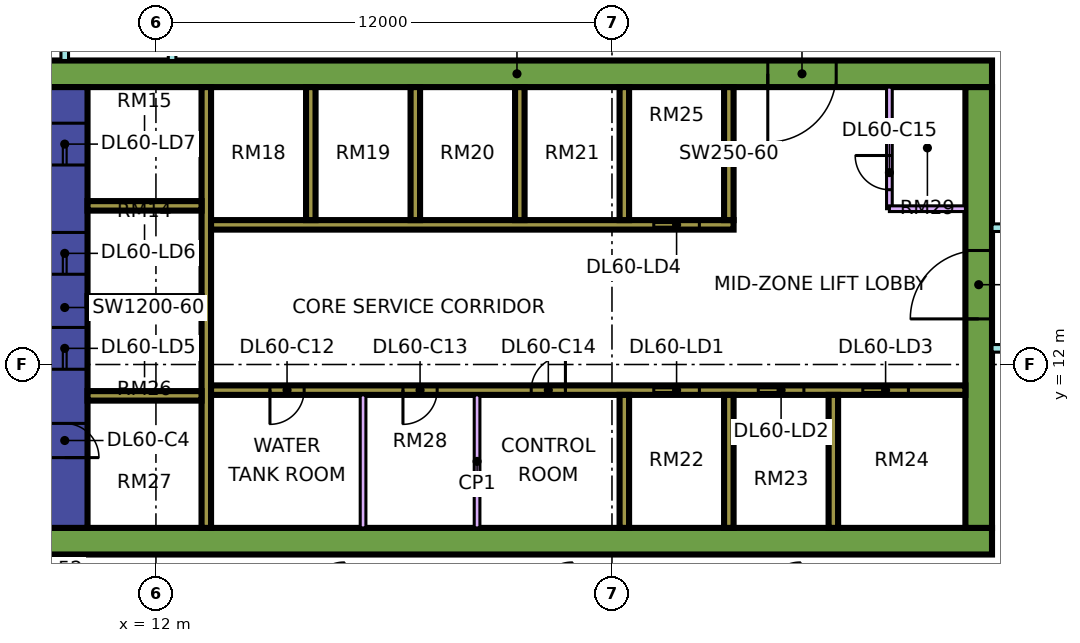
"""IFC4 building model, lengths in metres.
Left out: names, types, materials, properties, quantities, classifications, styles, units other than length and angle.
Written with IfcOpenShell. Run it as: python <this file> out.ifc"""

import sys

from ifc_helpers import new_model, si_unit, direction, frame, frame_2d, origin, place, context, subcontext, project, spatial, rectangle, extrude, element, fill, save


model = new_model("IFC4")
c1 = context("Model", 3, precision=1e-05, world=origin(), true_north=direction((0.0, 1.0)))
c2 = subcontext(c1, "Body", "Model", "MODEL_VIEW")
j1 = project(units=[si_unit("LENGTHUNIT", "METRE"), si_unit("PLANEANGLEUNIT", "RADIAN")], contexts=[c1])
p1 = place(None, origin())
s1 = spatial("IfcSite", under=j1, at=p1, CompositionType="ELEMENT")
p2 = place(p1, origin())
s2 = spatial("IfcBuilding", under=s1, at=p2, CompositionType="ELEMENT")
p3 = place(p2, frame((0.0, 0.0, 252.9)))
s3 = spatial("IfcBuildingStorey", under=s2, at=p3, CompositionType="ELEMENT", Elevation=252.9)
p4 = place(p3, frame((9.0, 7.35, 0.0), z_axis=(0.0, 0.0, 1.0), x_axis=(1.0, 0.0, 0.0)))
e1 = element("IfcWall", 1, at=p4, inside=s3, PredefinedType="SHEAR", context=c2, shape_type="SweptSolid", body=[
    extrude(rectangle(XDim=25.0, YDim=0.7, at=frame_2d((12.5, 0.0))), origin(), (0.0, 0.0, 1.0), 3.75),
])
p5 = place(p3, frame((9.0, 19.65, 0.0), z_axis=(0.0, 0.0, 1.0), x_axis=(1.0, 0.0, 0.0)))
e2 = element("IfcWall", 2, at=p5, inside=s3, PredefinedType="SHEAR", context=c2, shape_type="SweptSolid", body=[
    extrude(rectangle(XDim=25.0, YDim=0.7, at=frame_2d((12.5, 0.0))), origin(), (0.0, 0.0, 1.0), 3.75),
])
p6 = place(p5, frame((19.1, 0.0, 0.0)))
e3 = element("IfcOpeningElement", 3, at=p6, cuts=e2, PredefinedType="OPENING", context=c2, shape_type="SweptSolid", body=[
    extrude(rectangle(XDim=1.8, YDim=2.4, at=frame_2d((0.9, 1.2))), frame((0.0, 0.36, 0.0), z_axis=(0.0, -1.0, 0.0), x_axis=(1.0, 0.0, 0.0)), (0.0, 0.0, 1.0), 0.72),
])
p7 = place(p3, frame((9.6, 7.7, 0.0), z_axis=(0.0, 0.0, 1.0), x_axis=(0.0, 1.0, 0.0)))
e4 = element("IfcWall", 4, at=p7, inside=s3, PredefinedType="SHEAR", context=c2, shape_type="SweptSolid", body=[
    extrude(rectangle(XDim=11.6, YDim=1.2, at=frame_2d((5.8, 0.0))), origin(), (0.0, 0.0, 1.0), 3.75),
])
p8 = place(p7, frame((4.175, 0.0, 0.0)))
e5 = element("IfcOpeningElement", 5, at=p8, cuts=e4, PredefinedType="OPENING", context=c2, shape_type="SweptSolid", body=[
    extrude(rectangle(XDim=1.1, YDim=2.2, at=frame_2d((0.55, 1.1))), frame((0.0, 0.61, 0.0), z_axis=(0.0, -1.0, 0.0), x_axis=(1.0, 0.0, 0.0)), (0.0, 0.0, 1.0), 1.22),
])
p9 = place(p7, frame((6.675, 0.0, 0.0)))
e6 = element("IfcOpeningElement", 6, at=p9, cuts=e4, PredefinedType="OPENING", context=c2, shape_type="SweptSolid", body=[
    extrude(rectangle(XDim=1.1, YDim=2.2, at=frame_2d((0.55, 1.1))), frame((0.0, 0.61, 0.0), z_axis=(0.0, -1.0, 0.0), x_axis=(1.0, 0.0, 0.0)), (0.0, 0.0, 1.0), 1.22),
])
p10 = place(p7, frame((9.55, 0.0, 0.0)))
e7 = element("IfcOpeningElement", 7, at=p10, cuts=e4, PredefinedType="OPENING", context=c2, shape_type="SweptSolid", body=[
    extrude(rectangle(XDim=1.1, YDim=2.2, at=frame_2d((0.55, 1.1))), frame((0.0, 0.61, 0.0), z_axis=(0.0, -1.0, 0.0), x_axis=(1.0, 0.0, 0.0)), (0.0, 0.0, 1.0), 1.22),
])
p11 = place(p7, frame((1.85, 0.0, 0.0)))
e8 = element("IfcOpeningElement", 8, at=p11, cuts=e4, PredefinedType="OPENING", context=c2, shape_type="SweptSolid", body=[
    extrude(rectangle(XDim=0.9, YDim=2.1, at=frame_2d((0.45, 1.05))), frame((0.0, 0.61, 0.0), z_axis=(0.0, -1.0, 0.0), x_axis=(1.0, 0.0, 0.0)), (0.0, 0.0, 1.0), 1.22),
])
p12 = place(p3, frame((33.65, 7.7, 0.0), z_axis=(0.0, 0.0, 1.0), x_axis=(0.0, 1.0, 0.0)))
e9 = element("IfcWall", 9, at=p12, inside=s3, PredefinedType="SHEAR", context=c2, shape_type="SweptSolid", body=[
    extrude(rectangle(XDim=11.6, YDim=0.7, at=frame_2d((5.8, 0.0))), origin(), (0.0, 0.0, 1.0), 3.75),
])
p13 = place(p12, frame((5.5, 0.0, 0.0)))
e10 = element("IfcOpeningElement", 10, at=p13, cuts=e9, PredefinedType="OPENING", context=c2, shape_type="SweptSolid", body=[
    extrude(rectangle(XDim=1.8, YDim=2.4, at=frame_2d((0.9, 1.2))), frame((0.0, 0.36, 0.0), z_axis=(0.0, -1.0, 0.0), x_axis=(1.0, 0.0, 0.0)), (0.0, 0.0, 1.0), 0.72),
])
p14 = place(p3, frame((13.325, 7.7, 0.0), z_axis=(0.0, 0.0, 1.0), x_axis=(0.0, 1.0, 0.0)))
e11 = element("IfcWall", 11, at=p14, inside=s3, PredefinedType="SHEAR", context=c2, shape_type="SweptSolid", body=[
    extrude(rectangle(XDim=11.6, YDim=0.25, at=frame_2d((5.8, 0.0))), origin(), (0.0, 0.0, 1.0), 3.75),
])
p15 = place(p3, frame((13.45, 11.325, 0.0), z_axis=(0.0, 0.0, 1.0), x_axis=(1.0, 0.0, 0.0)))
e12 = element("IfcWall", 12, at=p15, inside=s3, PredefinedType="SHEAR", context=c2, shape_type="SweptSolid", body=[
    extrude(rectangle(XDim=19.85, YDim=0.25, at=frame_2d((9.925, 0.0))), origin(), (0.0, 0.0, 1.0), 3.75),
])
p16 = place(p15, frame((11.65, 0.0, 0.0)))
e13 = element("IfcOpeningElement", 13, at=p16, cuts=e12, PredefinedType="OPENING", context=c2, shape_type="SweptSolid", body=[
    extrude(rectangle(XDim=1.2, YDim=2.2, at=frame_2d((0.6, 1.1))), frame((0.0, 0.135, 0.0), z_axis=(0.0, -1.0, 0.0), x_axis=(1.0, 0.0, 0.0)), (0.0, 0.0, 1.0), 0.27),
])
p17 = place(p15, frame((14.4, 0.0, 0.0)))
e14 = element("IfcOpeningElement", 14, at=p17, cuts=e12, PredefinedType="OPENING", context=c2, shape_type="SweptSolid", body=[
    extrude(rectangle(XDim=1.2, YDim=2.2, at=frame_2d((0.6, 1.1))), frame((0.0, 0.135, 0.0), z_axis=(0.0, -1.0, 0.0), x_axis=(1.0, 0.0, 0.0)), (0.0, 0.0, 1.0), 0.27),
])
p18 = place(p15, frame((17.15, 0.0, 0.0)))
e15 = element("IfcOpeningElement", 15, at=p18, cuts=e12, PredefinedType="OPENING", context=c2, shape_type="SweptSolid", body=[
    extrude(rectangle(XDim=1.2, YDim=2.2, at=frame_2d((0.6, 1.1))), frame((0.0, 0.135, 0.0), z_axis=(0.0, -1.0, 0.0), x_axis=(1.0, 0.0, 0.0)), (0.0, 0.0, 1.0), 0.27),
])
p19 = place(p15, frame((1.55, 0.0, 0.0)))
e16 = element("IfcOpeningElement", 16, at=p19, cuts=e12, PredefinedType="OPENING", context=c2, shape_type="SweptSolid", body=[
    extrude(rectangle(XDim=0.9, YDim=2.1, at=frame_2d((0.45, 1.05))), frame((0.0, 0.135, 0.0), z_axis=(0.0, -1.0, 0.0), x_axis=(1.0, 0.0, 0.0)), (0.0, 0.0, 1.0), 0.27),
])
p20 = place(p15, frame((5.05, 0.0, 0.0)))
e17 = element("IfcOpeningElement", 17, at=p20, cuts=e12, PredefinedType="OPENING", context=c2, shape_type="SweptSolid", body=[
    extrude(rectangle(XDim=0.9, YDim=2.1, at=frame_2d((0.45, 1.05))), frame((0.0, 0.135, 0.0), z_axis=(0.0, -1.0, 0.0), x_axis=(1.0, 0.0, 0.0)), (0.0, 0.0, 1.0), 0.27),
])
p21 = place(p15, frame((8.425, 0.0, 0.0)))
e18 = element("IfcOpeningElement", 18, at=p21, cuts=e12, PredefinedType="OPENING", context=c2, shape_type="SweptSolid", body=[
    extrude(rectangle(XDim=0.9, YDim=2.1, at=frame_2d((0.45, 1.05))), frame((0.0, 0.135, 0.0), z_axis=(0.0, -1.0, 0.0), x_axis=(1.0, 0.0, 0.0)), (0.0, 0.0, 1.0), 0.27),
])
p22 = place(p3, frame((13.45, 15.675, 0.0), z_axis=(0.0, 0.0, 1.0), x_axis=(1.0, 0.0, 0.0)))
e19 = element("IfcWall", 19, at=p22, inside=s3, PredefinedType="SHEAR", context=c2, shape_type="SweptSolid", body=[
    extrude(rectangle(XDim=13.75, YDim=0.25, at=frame_2d((6.875, 0.0))), origin(), (0.0, 0.0, 1.0), 3.75),
])
p23 = place(p22, frame((11.65, 0.0, 0.0)))
e20 = element("IfcOpeningElement", 20, at=p23, cuts=e19, PredefinedType="OPENING", context=c2, shape_type="SweptSolid", body=[
    extrude(rectangle(XDim=1.2, YDim=2.2, at=frame_2d((0.6, 1.1))), frame((0.0, 0.135, 0.0), z_axis=(0.0, -1.0, 0.0), x_axis=(1.0, 0.0, 0.0)), (0.0, 0.0, 1.0), 0.27),
])
for number, where, z_axis, x_axis in (
    (21, (10.2, 11.175, 0.0), (0.0, 0.0, 1.0), (1.0, 0.0, 0.0)),
    (22, (10.2, 13.675, 0.0), (0.0, 0.0, 1.0), (1.0, 0.0, 0.0)),
    (23, (10.2, 16.175, 0.0), (0.0, 0.0, 1.0), (1.0, 0.0, 0.0)),
):
    element("IfcWall", number, at=place(p3, frame(where, z_axis=z_axis, x_axis=x_axis)), inside=s3, PredefinedType="SHEAR", context=c2, shape_type="SweptSolid", body=[
        extrude(rectangle(XDim=3.0, YDim=0.25, at=frame_2d((1.5, 0.0))), origin(), (0.0, 0.0, 1.0), 3.75),
    ])
for number, where, z_axis, x_axis in (
    (24, (24.325, 7.7, 0.0), (0.0, 0.0, 1.0), (0.0, 1.0, 0.0)),
    (25, (27.075, 7.7, 0.0), (0.0, 0.0, 1.0), (0.0, 1.0, 0.0)),
    (26, (29.825, 7.7, 0.0), (0.0, 0.0, 1.0), (0.0, 1.0, 0.0)),
    (27, (16.075, 15.8, 0.0), (0.0, 0.0, 1.0), (0.0, 1.0, 0.0)),
    (28, (18.825, 15.8, 0.0), (0.0, 0.0, 1.0), (0.0, 1.0, 0.0)),
    (29, (21.575, 15.8, 0.0), (0.0, 0.0, 1.0), (0.0, 1.0, 0.0)),
    (30, (24.325, 15.8, 0.0), (0.0, 0.0, 1.0), (0.0, 1.0, 0.0)),
    (31, (27.075, 15.8, 0.0), (0.0, 0.0, 1.0), (0.0, 1.0, 0.0)),
):
    element("IfcWall", number, at=place(p3, frame(where, z_axis=z_axis, x_axis=x_axis)), inside=s3, PredefinedType="SHEAR", context=c2, shape_type="SweptSolid", body=[
        extrude(rectangle(XDim=3.5, YDim=0.25, at=frame_2d((1.75, 0.0))), origin(), (0.0, 0.0, 1.0), 3.75),
    ])
p24 = place(p3, frame((-1.447, 12.553, 0.0), z_axis=(0.0, 0.0, 1.0), x_axis=(0.707106781187, -0.707106781187, 0.0)))
e32 = element("IfcWall", 32, at=p24, inside=s3, PredefinedType="SOLIDWALL", context=c2, shape_type="SweptSolid", body=[
    extrude(rectangle(XDim=19.799, YDim=0.15, at=frame_2d((9.899, 0.0))), origin(), (0.0, 0.0, 1.0), 3.3),
])
p25 = place(p24, frame((2.212, 0.0, 0.45)))
e33 = element("IfcOpeningElement", 33, at=p25, cuts=e32, PredefinedType="OPENING", context=c2, shape_type="SweptSolid", body=[
    extrude(rectangle(XDim=3.0, YDim=2.4, at=frame_2d((1.5, 1.2))), frame((0.0, 0.085, 0.0), z_axis=(0.0, -1.0, 0.0), x_axis=(1.0, 0.0, 0.0)), (0.0, 0.0, 1.0), 0.17),
])
p26 = place(p24, frame((10.216, 0.0, 0.45)))
e34 = element("IfcOpeningElement", 34, at=p26, cuts=e32, PredefinedType="OPENING", context=c2, shape_type="SweptSolid", body=[
    extrude(rectangle(XDim=3.0, YDim=2.4, at=frame_2d((1.5, 1.2))), frame((0.0, 0.085, 0.0), z_axis=(0.0, -1.0, 0.0), x_axis=(1.0, 0.0, 0.0)), (0.0, 0.0, 1.0), 0.17),
])
for number, where, z_axis, x_axis in (
    (35, (17.45, 7.7, 0.0), (0.0, 0.0, 1.0), (0.0, 1.0, 0.0)),
    (36, (20.45, 7.7, 0.0), (0.0, 0.0, 1.0), (0.0, 1.0, 0.0)),
):
    element("IfcWall", number, at=place(p3, frame(where, z_axis=z_axis, x_axis=x_axis)), inside=s3, PredefinedType="PARTITIONING", context=c2, shape_type="SweptSolid", body=[
        extrude(rectangle(XDim=3.5, YDim=0.15, at=frame_2d((1.75, 0.0))), origin(), (0.0, 0.0, 1.0), 3.3),
    ])
p27 = place(p3, frame((31.3, 16.1, 0.0), z_axis=(0.0, 0.0, 1.0), x_axis=(0.0, 1.0, 0.0)))
e37 = element("IfcWall", 37, at=p27, inside=s3, PredefinedType="PARTITIONING", context=c2, shape_type="SweptSolid", body=[
    extrude(rectangle(XDim=3.2, YDim=0.15, at=frame_2d((1.6, 0.0))), origin(), (0.0, 0.0, 1.0), 3.3),
])
p28 = place(p27, frame((0.5, 0.0, 0.0)))
e38 = element("IfcOpeningElement", 38, at=p28, cuts=e37, PredefinedType="OPENING", context=c2, shape_type="SweptSolid", body=[
    extrude(rectangle(XDim=0.9, YDim=2.1, at=frame_2d((0.45, 1.05))), frame((0.0, 0.085, 0.0), z_axis=(0.0, -1.0, 0.0), x_axis=(1.0, 0.0, 0.0)), (0.0, 0.0, 1.0), 0.17),
])
p29 = place(p3, frame((31.3, 16.1, 0.0), z_axis=(0.0, 0.0, 1.0), x_axis=(1.0, 0.0, 0.0)))
e39 = element("IfcWall", 39, at=p29, inside=s3, PredefinedType="PARTITIONING", context=c2, shape_type="SweptSolid", body=[
    extrude(rectangle(XDim=2.0, YDim=0.15, at=frame_2d((1.0, 0.0))), origin(), (0.0, 0.0, 1.0), 3.3),
])
p30 = place(p3, frame((9.6, 20.0, 0.0), z_axis=(0.0, 0.0, 1.0), x_axis=(0.0, 1.0, 0.0)))
e40 = element("IfcWall", 40, at=p30, inside=s3, PredefinedType="PARTITIONING", context=c2, shape_type="SweptSolid", body=[
    extrude(rectangle(XDim=44.35, YDim=0.2, at=frame_2d((22.175, 0.0))), origin(), (0.0, 0.0, 1.0), 3.3),
])
p31 = place(p30, frame((28.8, 0.0, 0.0)))
e41 = element("IfcOpeningElement", 41, at=p31, cuts=e40, PredefinedType="OPENING", context=c2, shape_type="SweptSolid", body=[
    extrude(rectangle(XDim=1.0, YDim=2.1, at=frame_2d((0.5, 1.05))), frame((0.0, 0.11, 0.0), z_axis=(0.0, -1.0, 0.0), x_axis=(1.0, 0.0, 0.0)), (0.0, 0.0, 1.0), 0.22),
])
p32 = place(p30, frame((0.6, 0.0, 0.0)))
e42 = element("IfcOpeningElement", 42, at=p32, cuts=e40, PredefinedType="OPENING", context=c2, shape_type="SweptSolid", body=[
    extrude(rectangle(XDim=1.2, YDim=2.1, at=frame_2d((0.6, 1.05))), frame((0.0, 0.11, 0.0), z_axis=(0.0, -1.0, 0.0), x_axis=(1.0, 0.0, 0.0)), (0.0, 0.0, 1.0), 0.22),
])
p33 = place(p30, frame((3.9, 0.0, 0.0)))
e43 = element("IfcOpeningElement", 43, at=p33, cuts=e40, PredefinedType="OPENING", context=c2, shape_type="SweptSolid", body=[
    extrude(rectangle(XDim=1.0, YDim=2.1, at=frame_2d((0.5, 1.05))), frame((0.0, 0.11, 0.0), z_axis=(0.0, -1.0, 0.0), x_axis=(1.0, 0.0, 0.0)), (0.0, 0.0, 1.0), 0.22),
])
p34 = place(p3, frame((12.425, 20.0, 0.0), z_axis=(0.0, 0.0, 1.0), x_axis=(0.0, 1.0, 0.0)))
e44 = element("IfcWall", 44, at=p34, inside=s3, PredefinedType="PARTITIONING", context=c2, shape_type="SweptSolid", body=[
    extrude(rectangle(XDim=42.926, YDim=0.2, at=frame_2d((21.463, 0.0))), origin(), (0.0, 0.0, 1.0), 3.3),
])
p35 = place(p34, frame((7.0, 0.0, 0.0)))
e45 = element("IfcOpeningElement", 45, at=p35, cuts=e44, PredefinedType="OPENING", context=c2, shape_type="SweptSolid", body=[
    extrude(rectangle(XDim=1.0, YDim=2.1, at=frame_2d((0.5, 1.05))), frame((0.0, 0.11, 0.0), z_axis=(0.0, -1.0, 0.0), x_axis=(1.0, 0.0, 0.0)), (0.0, 0.0, 1.0), 0.22),
])
p36 = place(p34, frame((12.95, 0.0, 0.0)))
e46 = element("IfcOpeningElement", 46, at=p36, cuts=e44, PredefinedType="OPENING", context=c2, shape_type="SweptSolid", body=[
    extrude(rectangle(XDim=1.0, YDim=2.1, at=frame_2d((0.5, 1.05))), frame((0.0, 0.11, 0.0), z_axis=(0.0, -1.0, 0.0), x_axis=(1.0, 0.0, 0.0)), (0.0, 0.0, 1.0), 0.22),
])
p37 = place(p34, frame((16.75, 0.0, 0.0)))
e47 = element("IfcOpeningElement", 47, at=p37, cuts=e44, PredefinedType="OPENING", context=c2, shape_type="SweptSolid", body=[
    extrude(rectangle(XDim=1.0, YDim=2.1, at=frame_2d((0.5, 1.05))), frame((0.0, 0.11, 0.0), z_axis=(0.0, -1.0, 0.0), x_axis=(1.0, 0.0, 0.0)), (0.0, 0.0, 1.0), 0.22),
])
p38 = place(p34, frame((34.9, 0.0, 0.0)))
e48 = element("IfcOpeningElement", 48, at=p38, cuts=e44, PredefinedType="OPENING", context=c2, shape_type="SweptSolid", body=[
    extrude(rectangle(XDim=1.0, YDim=2.1, at=frame_2d((0.5, 1.05))), frame((0.0, 0.11, 0.0), z_axis=(0.0, -1.0, 0.0), x_axis=(1.0, 0.0, 0.0)), (0.0, 0.0, 1.0), 0.22),
])
p39 = place(p34, frame((1.15, 0.0, 0.0)))
e49 = element("IfcOpeningElement", 49, at=p39, cuts=e44, PredefinedType="OPENING", context=c2, shape_type="SweptSolid", body=[
    extrude(rectangle(XDim=1.8, YDim=2.1, at=frame_2d((0.9, 1.05))), frame((0.0, 0.11, 0.0), z_axis=(0.0, -1.0, 0.0), x_axis=(1.0, 0.0, 0.0)), (0.0, 0.0, 1.0), 0.22),
])
p40 = place(p34, frame((28.6, 0.0, 0.0)))
e50 = element("IfcOpeningElement", 50, at=p40, cuts=e44, PredefinedType="OPENING", context=c2, shape_type="SweptSolid", body=[
    extrude(rectangle(XDim=1.8, YDim=2.1, at=frame_2d((0.9, 1.05))), frame((0.0, 0.11, 0.0), z_axis=(0.0, -1.0, 0.0), x_axis=(1.0, 0.0, 0.0)), (0.0, 0.0, 1.0), 0.22),
])
p41 = place(p3, frame((34.0, 12.425, 0.0), z_axis=(0.0, 0.0, 1.0), x_axis=(1.0, 0.0, 0.0)))
e51 = element("IfcWall", 51, at=p41, inside=s3, PredefinedType="PARTITIONING", context=c2, shape_type="SweptSolid", body=[
    extrude(rectangle(XDim=2.426, YDim=0.2, at=frame_2d((1.213, 0.0))), origin(), (0.0, 0.0, 1.0), 3.3),
])
p42 = place(p3, frame((34.0, 15.6, 0.0), z_axis=(0.0, 0.0, 1.0), x_axis=(1.0, 0.0, 0.0)))
e52 = element("IfcWall", 52, at=p42, inside=s3, PredefinedType="PARTITIONING", context=c2, shape_type="SweptSolid", body=[
    extrude(rectangle(XDim=10.35, YDim=0.2, at=frame_2d((5.175, 0.0))), origin(), (0.0, 0.0, 1.0), 3.3),
])
p43 = place(p42, frame((5.6, 0.0, 0.0)))
e53 = element("IfcOpeningElement", 53, at=p43, cuts=e52, PredefinedType="OPENING", context=c2, shape_type="SweptSolid", body=[
    extrude(rectangle(XDim=1.0, YDim=2.1, at=frame_2d((0.5, 1.05))), frame((0.0, 0.11, 0.0), z_axis=(0.0, -1.0, 0.0), x_axis=(1.0, 0.0, 0.0)), (0.0, 0.0, 1.0), 0.22),
])
p44 = place(p42, frame((0.45, 0.0, 0.0)))
e54 = element("IfcOpeningElement", 54, at=p44, cuts=e52, PredefinedType="OPENING", context=c2, shape_type="SweptSolid", body=[
    extrude(rectangle(XDim=1.2, YDim=2.1, at=frame_2d((0.6, 1.05))), frame((0.0, 0.11, 0.0), z_axis=(0.0, -1.0, 0.0), x_axis=(1.0, 0.0, 0.0)), (0.0, 0.0, 1.0), 0.22),
])
p45 = place(p16, origin())
e55 = element("IfcDoor", 55, at=p45, inside=s3, OperationType="DOUBLE_DOOR_SLIDING", PredefinedType="DOOR", context=c2, shape_type="SweptSolid", body=[
    extrude(rectangle(XDim=1.2, YDim=2.2, at=frame_2d((0.6, 1.1))), frame((0.0, 0.025, 0.0), z_axis=(0.0, -1.0, 0.0), x_axis=(1.0, 0.0, 0.0)), (0.0, 0.0, 1.0), 0.05),
])
fill(e13, e55)
p46 = place(p17, origin())
e56 = element("IfcDoor", 56, at=p46, inside=s3, OperationType="DOUBLE_DOOR_SLIDING", PredefinedType="DOOR", context=c2, shape_type="SweptSolid", body=[
    extrude(rectangle(XDim=1.2, YDim=2.2, at=frame_2d((0.6, 1.1))), frame((0.0, 0.025, 0.0), z_axis=(0.0, -1.0, 0.0), x_axis=(1.0, 0.0, 0.0)), (0.0, 0.0, 1.0), 0.05),
])
fill(e14, e56)
p47 = place(p18, origin())
e57 = element("IfcDoor", 57, at=p47, inside=s3, OperationType="DOUBLE_DOOR_SLIDING", PredefinedType="DOOR", context=c2, shape_type="SweptSolid", body=[
    extrude(rectangle(XDim=1.2, YDim=2.2, at=frame_2d((0.6, 1.1))), frame((0.0, 0.025, 0.0), z_axis=(0.0, -1.0, 0.0), x_axis=(1.0, 0.0, 0.0)), (0.0, 0.0, 1.0), 0.05),
])
fill(e15, e57)
p48 = place(p23, origin())
e58 = element("IfcDoor", 58, at=p48, inside=s3, OperationType="DOUBLE_DOOR_SLIDING", PredefinedType="DOOR", context=c2, shape_type="SweptSolid", body=[
    extrude(rectangle(XDim=1.2, YDim=2.2, at=frame_2d((0.6, 1.1))), frame((0.0, 0.025, 0.0), z_axis=(0.0, -1.0, 0.0), x_axis=(1.0, 0.0, 0.0)), (0.0, 0.0, 1.0), 0.05),
])
fill(e20, e58)
p49 = place(p8, origin())
e59 = element("IfcDoor", 59, at=p49, inside=s3, OperationType="DOUBLE_DOOR_SLIDING", PredefinedType="DOOR", context=c2, shape_type="SweptSolid", body=[
    extrude(rectangle(XDim=1.1, YDim=2.2, at=frame_2d((0.55, 1.1))), frame((0.0, 0.025, 0.0), z_axis=(0.0, -1.0, 0.0), x_axis=(1.0, 0.0, 0.0)), (0.0, 0.0, 1.0), 0.05),
])
fill(e5, e59)
p50 = place(p9, origin())
e60 = element("IfcDoor", 60, at=p50, inside=s3, OperationType="DOUBLE_DOOR_SLIDING", PredefinedType="DOOR", context=c2, shape_type="SweptSolid", body=[
    extrude(rectangle(XDim=1.1, YDim=2.2, at=frame_2d((0.55, 1.1))), frame((0.0, 0.025, 0.0), z_axis=(0.0, -1.0, 0.0), x_axis=(1.0, 0.0, 0.0)), (0.0, 0.0, 1.0), 0.05),
])
fill(e6, e60)
p51 = place(p10, origin())
e61 = element("IfcDoor", 61, at=p51, inside=s3, OperationType="DOUBLE_DOOR_SLIDING", PredefinedType="DOOR", context=c2, shape_type="SweptSolid", body=[
    extrude(rectangle(XDim=1.1, YDim=2.2, at=frame_2d((0.55, 1.1))), frame((0.0, 0.025, 0.0), z_axis=(0.0, -1.0, 0.0), x_axis=(1.0, 0.0, 0.0)), (0.0, 0.0, 1.0), 0.05),
])
fill(e7, e61)
p52 = place(p13, origin())
e62 = element("IfcDoor", 62, at=p52, inside=s3, OperationType="DOUBLE_DOOR_SINGLE_SWING", PredefinedType="DOOR", context=c2, shape_type="SweptSolid", body=[
    extrude(rectangle(XDim=1.8, YDim=2.4, at=frame_2d((0.9, 1.2))), frame((0.0, 0.025, 0.0), z_axis=(0.0, -1.0, 0.0), x_axis=(1.0, 0.0, 0.0)), (0.0, 0.0, 1.0), 0.05),
])
fill(e10, e62)
p53 = place(p6, frame((1.8, 0.0, 0.0), z_axis=(0.0, 0.0, 1.0), x_axis=(-1.0, 0.0, 0.0)))
e63 = element("IfcDoor", 63, at=p53, inside=s3, OperationType="DOUBLE_DOOR_SINGLE_SWING", PredefinedType="DOOR", context=c2, shape_type="SweptSolid", body=[
    extrude(rectangle(XDim=1.8, YDim=2.4, at=frame_2d((0.9, 1.2))), frame((0.0, 0.025, 0.0), z_axis=(0.0, -1.0, 0.0), x_axis=(1.0, 0.0, 0.0)), (0.0, 0.0, 1.0), 0.05),
])
fill(e3, e63)
p54 = place(p11, frame((0.9, 0.0, 0.0), z_axis=(0.0, 0.0, 1.0), x_axis=(-1.0, 0.0, 0.0)))
e64 = element("IfcDoor", 64, at=p54, inside=s3, OperationType="SINGLE_SWING_LEFT", PredefinedType="DOOR", context=c2, shape_type="SweptSolid", body=[
    extrude(rectangle(XDim=0.9, YDim=2.1, at=frame_2d((0.45, 1.05))), frame((0.0, 0.025, 0.0), z_axis=(0.0, -1.0, 0.0), x_axis=(1.0, 0.0, 0.0)), (0.0, 0.0, 1.0), 0.05),
])
fill(e8, e64)
p55 = place(p19, frame((0.9, 0.0, 0.0), z_axis=(0.0, 0.0, 1.0), x_axis=(-1.0, 0.0, 0.0)))
e65 = element("IfcDoor", 65, at=p55, inside=s3, OperationType="SINGLE_SWING_LEFT", PredefinedType="DOOR", context=c2, shape_type="SweptSolid", body=[
    extrude(rectangle(XDim=0.9, YDim=2.1, at=frame_2d((0.45, 1.05))), frame((0.0, 0.025, 0.0), z_axis=(0.0, -1.0, 0.0), x_axis=(1.0, 0.0, 0.0)), (0.0, 0.0, 1.0), 0.05),
])
fill(e16, e65)
p56 = place(p20, frame((0.9, 0.0, 0.0), z_axis=(0.0, 0.0, 1.0), x_axis=(-1.0, 0.0, 0.0)))
e66 = element("IfcDoor", 66, at=p56, inside=s3, OperationType="SINGLE_SWING_LEFT", PredefinedType="DOOR", context=c2, shape_type="SweptSolid", body=[
    extrude(rectangle(XDim=0.9, YDim=2.1, at=frame_2d((0.45, 1.05))), frame((0.0, 0.025, 0.0), z_axis=(0.0, -1.0, 0.0), x_axis=(1.0, 0.0, 0.0)), (0.0, 0.0, 1.0), 0.05),
])
fill(e17, e66)
p57 = place(p21, frame((0.9, 0.0, 0.0), z_axis=(0.0, 0.0, 1.0), x_axis=(-1.0, 0.0, 0.0)))
e67 = element("IfcDoor", 67, at=p57, inside=s3, OperationType="SINGLE_SWING_RIGHT", PredefinedType="DOOR", context=c2, shape_type="SweptSolid", body=[
    extrude(rectangle(XDim=0.9, YDim=2.1, at=frame_2d((0.45, 1.05))), frame((0.0, 0.025, 0.0), z_axis=(0.0, -1.0, 0.0), x_axis=(1.0, 0.0, 0.0)), (0.0, 0.0, 1.0), 0.05),
])
fill(e18, e67)
p58 = place(p28, frame((0.9, 0.0, 0.0), z_axis=(0.0, 0.0, 1.0), x_axis=(-1.0, 0.0, 0.0)))
e68 = element("IfcDoor", 68, at=p58, inside=s3, OperationType="SINGLE_SWING_RIGHT", PredefinedType="DOOR", context=c2, shape_type="SweptSolid", body=[
    extrude(rectangle(XDim=0.9, YDim=2.1, at=frame_2d((0.45, 1.05))), frame((0.0, 0.025, 0.0), z_axis=(0.0, -1.0, 0.0), x_axis=(1.0, 0.0, 0.0)), (0.0, 0.0, 1.0), 0.05),
])
fill(e38, e68)
save(model, sys.argv[1])
